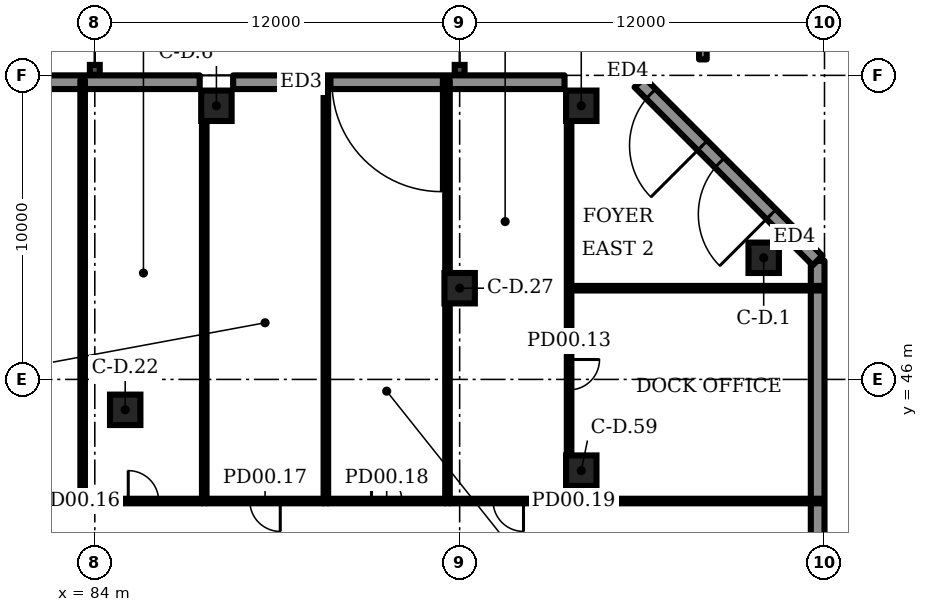
"""IFC4 building model, lengths in metres.
Left out: names, types, materials, properties, quantities, classifications, styles, units other than length and angle.
Written with IfcOpenShell. Run it as: python <this file> out.ifc"""

import sys

from ifc_helpers import new_model, si_unit, direction, frame, frame_2d, origin, origin_2d, place, context, subcontext, project, spatial, rectangle, hollow_circle, extrude, element, fill, save


model = new_model("IFC4")
c1 = context("Model", 3, precision=1e-05, world=origin(), true_north=direction((0.0, 1.0)))
c2 = subcontext(c1, "Body", "Model", "MODEL_VIEW")
j1 = project(units=[si_unit("LENGTHUNIT", "METRE"), si_unit("PLANEANGLEUNIT", "RADIAN")], contexts=[c1])
p1 = place(None, origin())
s1 = spatial("IfcSite", under=j1, at=p1, CompositionType="ELEMENT")
p2 = place(p1, origin())
s2 = spatial("IfcBuilding", under=s1, at=p2, CompositionType="ELEMENT")
p3 = place(p2, origin())
s3 = spatial("IfcBuildingStorey", under=s2, at=p3, CompositionType="ELEMENT", Elevation=0.0)
for number, where, z_axis, x_axis in (
    (1, (106.0, 50.0, 0.0), (0.0, 0.0, 1.0), (1.0, 0.0, 0.0)),
    (2, (88.0, 55.0, 0.0), (0.0, 0.0, 1.0), (1.0, 0.0, 0.0)),
    (3, (85.0, 45.0, 0.0), (0.0, 0.0, 1.0), (1.0, 0.0, 0.0)),
    (4, (96.0, 49.0, 0.0), (0.0, 0.0, 1.0), (1.0, 0.0, 0.0)),
    (5, (100.0, 43.0, 0.0), (0.0, 0.0, 1.0), (1.0, 0.0, 0.0)),
    (6, (100.0, 55.0, 0.0), (0.0, 0.0, 1.0), (1.0, 0.0, 0.0)),
):
    element("IfcColumn", number, at=place(p3, frame(where, z_axis=z_axis, x_axis=x_axis)), inside=s3, PredefinedType="COLUMN", context=c2, shape_type="SweptSolid", body=[
        extrude(rectangle(XDim=1.0, YDim=1.0, at=origin_2d()), origin(), (0.0, 0.0, 1.0), 8.0),
    ])
p4 = place(p3, frame((107.775, 26.55, 0.0), z_axis=(0.0, 0.0, 1.0), x_axis=(0.0, 1.0, 0.0)))
e7 = element("IfcWall", 7, at=p4, inside=s3, PredefinedType="SOLIDWALL", context=c2, shape_type="SweptSolid", body=[
    extrude(rectangle(XDim=23.35, YDim=0.45, at=frame_2d((11.675, 0.0))), origin(), (0.0, 0.0, 1.0), 7.7),
])
p5 = place(p4, frame((10.85, 0.0, 0.0)))
e8 = element("IfcOpeningElement", 8, at=p5, cuts=e7, PredefinedType="OPENING", context=c2, shape_type="SweptSolid", body=[
    extrude(rectangle(XDim=2.4, YDim=2.4, at=frame_2d((1.2, 1.2))), frame((0.0, 0.235, 0.0), z_axis=(0.0, -1.0, 0.0), x_axis=(1.0, 0.0, 0.0)), (0.0, 0.0, 1.0), 0.47),
])
p6 = place(p3, frame((107.77, 49.912, 0.0), z_axis=(0.0, 0.0, 1.0), x_axis=(-0.707107, 0.707107, 0.0)))
e9 = element("IfcWall", 9, at=p6, inside=s3, PredefinedType="SOLIDWALL", context=c2, shape_type="SweptSolid", body=[
    extrude(rectangle(XDim=8.285, YDim=0.45, at=frame_2d((4.143, 0.0))), origin(), (0.0, 0.0, 1.0), 7.7),
])
p7 = place(p6, frame((2.15, 0.0, 0.0)))
e10 = element("IfcOpeningElement", 10, at=p7, cuts=e9, PredefinedType="OPENING", context=c2, shape_type="SweptSolid", body=[
    extrude(rectangle(XDim=2.4, YDim=2.4, at=frame_2d((1.2, 1.2))), frame((0.0, 0.235, 0.0), z_axis=(0.0, -1.0, 0.0), x_axis=(1.0, 0.0, 0.0)), (0.0, 0.0, 1.0), 0.47),
])
p8 = place(p6, frame((5.35, 0.0, 0.0)))
e11 = element("IfcOpeningElement", 11, at=p8, cuts=e9, PredefinedType="OPENING", context=c2, shape_type="SweptSolid", body=[
    extrude(rectangle(XDim=2.4, YDim=2.4, at=frame_2d((1.2, 1.2))), frame((0.0, 0.235, 0.0), z_axis=(0.0, -1.0, 0.0), x_axis=(1.0, 0.0, 0.0)), (0.0, 0.0, 1.0), 0.47),
])
p9 = place(p3, frame((99.45, 55.775, 0.0), z_axis=(0.0, 0.0, 1.0), x_axis=(-1.0, 0.0, 0.0)))
e12 = element("IfcWall", 12, at=p9, inside=s3, PredefinedType="SOLIDWALL", context=c2, shape_type="SweptSolid", body=[
    extrude(rectangle(XDim=10.9, YDim=0.45, at=frame_2d((5.45, 0.0))), origin(), (0.0, 0.0, 1.0), 7.7),
])
p10 = place(p9, frame((4.05, 0.0, 0.0)))
e13 = element("IfcOpeningElement", 13, at=p10, cuts=e12, PredefinedType="OPENING", context=c2, shape_type="SweptSolid", body=[
    extrude(rectangle(XDim=3.6, YDim=4.5, at=frame_2d((1.8, 2.25))), frame((0.0, 0.235, 0.0), z_axis=(0.0, -1.0, 0.0), x_axis=(1.0, 0.0, 0.0)), (0.0, 0.0, 1.0), 0.47),
])
p11 = place(p3, frame((87.45, 55.775, 0.0), z_axis=(0.0, 0.0, 1.0), x_axis=(-1.0, 0.0, 0.0)))
e14 = element("IfcWall", 14, at=p11, inside=s3, PredefinedType="SOLIDWALL", context=c2, shape_type="SweptSolid", body=[
    extrude(rectangle(XDim=10.9, YDim=0.45, at=frame_2d((5.45, 0.0))), origin(), (0.0, 0.0, 1.0), 7.7),
])
p12 = place(p11, frame((5.25, 0.0, 0.0)))
e15 = element("IfcOpeningElement", 15, at=p12, cuts=e14, PredefinedType="OPENING", context=c2, shape_type="SweptSolid", body=[
    extrude(rectangle(XDim=3.6, YDim=4.5, at=frame_2d((1.8, 2.25))), frame((0.0, 0.235, 0.0), z_axis=(0.0, -1.0, 0.0), x_axis=(1.0, 0.0, 0.0)), (0.0, 0.0, 1.0), 0.47),
])
p13 = place(p3, frame((104.0, 64.0, 0.0), z_axis=(0.0, 0.0, 1.0), x_axis=(0.0, -1.0, 0.0)))
e16 = element("IfcWall", 16, at=p13, inside=s3, PredefinedType="SOLIDWALL", context=c2, shape_type="SweptSolid", body=[
    extrude(rectangle(XDim=7.475, YDim=0.25, at=frame_2d((3.738, 0.0))), origin(), (0.0, 0.0, 1.0), 2.6),
])
p14 = place(p13, frame((3.038, 0.0, 0.0)))
e17 = element("IfcOpeningElement", 17, at=p14, cuts=e16, PredefinedType="OPENING", context=c2, shape_type="SweptSolid", body=[
    extrude(rectangle(XDim=1.4, YDim=2.2, at=frame_2d((0.7, 1.1))), frame((0.0, 0.135, 0.0), z_axis=(0.0, -1.0, 0.0), x_axis=(1.0, 0.0, 0.0)), (0.0, 0.0, 1.0), 0.27),
])
p15 = place(p3, frame((83.675, 42.0, 0.0), z_axis=(0.0, 0.0, 1.0), x_axis=(1.0, 0.0, 0.0)))
e18 = element("IfcWall", 18, at=p15, inside=s3, PredefinedType="PARTITIONING", context=c2, shape_type="SweptSolid", body=[
    extrude(rectangle(XDim=3.85, YDim=0.15, at=frame_2d((1.925, 0.0))), origin(), (0.0, 0.0, 1.0), 7.7),
])
p16 = place(p15, frame((1.425, 0.0, 0.0)))
e19 = element("IfcOpeningElement", 19, at=p16, cuts=e18, PredefinedType="OPENING", context=c2, shape_type="SweptSolid", body=[
    extrude(rectangle(XDim=1.0, YDim=2.1, at=frame_2d((0.5, 1.05))), frame((0.0, 0.085, 0.0), z_axis=(0.0, -1.0, 0.0), x_axis=(1.0, 0.0, 0.0)), (0.0, 0.0, 1.0), 0.17),
])
p17 = place(p3, frame((87.675, 42.0, 0.0), z_axis=(0.0, 0.0, 1.0), x_axis=(1.0, 0.0, 0.0)))
e20 = element("IfcWall", 20, at=p17, inside=s3, PredefinedType="PARTITIONING", context=c2, shape_type="SweptSolid", body=[
    extrude(rectangle(XDim=3.85, YDim=0.15, at=frame_2d((1.925, 0.0))), origin(), (0.0, 0.0, 1.0), 7.7),
])
p18 = place(p17, frame((1.425, 0.0, 0.0)))
e21 = element("IfcOpeningElement", 21, at=p18, cuts=e20, PredefinedType="OPENING", context=c2, shape_type="SweptSolid", body=[
    extrude(rectangle(XDim=1.0, YDim=2.1, at=frame_2d((0.5, 1.05))), frame((0.0, 0.085, 0.0), z_axis=(0.0, -1.0, 0.0), x_axis=(1.0, 0.0, 0.0)), (0.0, 0.0, 1.0), 0.17),
])
p19 = place(p3, frame((91.675, 42.0, 0.0), z_axis=(0.0, 0.0, 1.0), x_axis=(1.0, 0.0, 0.0)))
e22 = element("IfcWall", 22, at=p19, inside=s3, PredefinedType="PARTITIONING", context=c2, shape_type="SweptSolid", body=[
    extrude(rectangle(XDim=3.85, YDim=0.15, at=frame_2d((1.925, 0.0))), origin(), (0.0, 0.0, 1.0), 7.7),
])
p20 = place(p19, frame((1.425, 0.0, 0.0)))
e23 = element("IfcOpeningElement", 23, at=p20, cuts=e22, PredefinedType="OPENING", context=c2, shape_type="SweptSolid", body=[
    extrude(rectangle(XDim=1.0, YDim=2.1, at=frame_2d((0.5, 1.05))), frame((0.0, 0.085, 0.0), z_axis=(0.0, -1.0, 0.0), x_axis=(1.0, 0.0, 0.0)), (0.0, 0.0, 1.0), 0.17),
])
p21 = place(p3, frame((95.675, 42.0, 0.0), z_axis=(0.0, 0.0, 1.0), x_axis=(1.0, 0.0, 0.0)))
e24 = element("IfcWall", 24, at=p21, inside=s3, PredefinedType="PARTITIONING", context=c2, shape_type="SweptSolid", body=[
    extrude(rectangle(XDim=3.85, YDim=0.15, at=frame_2d((1.925, 0.0))), origin(), (0.0, 0.0, 1.0), 7.7),
])
p22 = place(p21, frame((1.425, 0.0, 0.0)))
e25 = element("IfcOpeningElement", 25, at=p22, cuts=e24, PredefinedType="OPENING", context=c2, shape_type="SweptSolid", body=[
    extrude(rectangle(XDim=1.0, YDim=2.1, at=frame_2d((0.5, 1.05))), frame((0.0, 0.085, 0.0), z_axis=(0.0, -1.0, 0.0), x_axis=(1.0, 0.0, 0.0)), (0.0, 0.0, 1.0), 0.17),
])
for number, where, z_axis, x_axis in (
    (26, (99.675, 42.0, 0.0), (0.0, 0.0, 1.0), (1.0, 0.0, 0.0)),
    (27, (99.675, 49.0, 0.0), (0.0, 0.0, 1.0), (1.0, 0.0, 0.0)),
):
    element("IfcWall", number, at=place(p3, frame(where, z_axis=z_axis, x_axis=x_axis)), inside=s3, PredefinedType="PARTITIONING", context=c2, shape_type="SweptSolid", body=[
        extrude(rectangle(XDim=8.22, YDim=0.15, at=frame_2d((4.11, 0.0))), origin(), (0.0, 0.0, 1.0), 7.7),
    ])
p23 = place(p3, frame((99.6, 41.925, 0.0), z_axis=(0.0, 0.0, 1.0), x_axis=(0.0, 1.0, 0.0)))
e28 = element("IfcWall", 28, at=p23, inside=s3, PredefinedType="PARTITIONING", context=c2, shape_type="SweptSolid", body=[
    extrude(rectangle(XDim=0.565, YDim=0.15, at=frame_2d((0.282, 0.0))), origin(), (0.0, 0.0, 1.0), 7.7),
])
p24 = place(p3, frame((99.6, 43.51, 0.0), z_axis=(0.0, 0.0, 1.0), x_axis=(0.0, 1.0, 0.0)))
e29 = element("IfcWall", 29, at=p24, inside=s3, PredefinedType="PARTITIONING", context=c2, shape_type="SweptSolid", body=[
    extrude(rectangle(XDim=10.98, YDim=0.15, at=frame_2d((5.49, 0.0))), origin(), (0.0, 0.0, 1.0), 7.7),
])
p25 = place(p24, frame((2.145, 0.0, 0.0)))
e30 = element("IfcOpeningElement", 30, at=p25, cuts=e29, PredefinedType="OPENING", context=c2, shape_type="SweptSolid", body=[
    extrude(rectangle(XDim=1.0, YDim=2.1, at=frame_2d((0.5, 1.05))), frame((0.0, 0.085, 0.0), z_axis=(0.0, -1.0, 0.0), x_axis=(1.0, 0.0, 0.0)), (0.0, 0.0, 1.0), 0.17),
])
p26 = place(p3, frame((87.6, 41.925, 0.0), z_axis=(0.0, 0.0, 1.0), x_axis=(0.0, 1.0, 0.0)))
e31 = element("IfcWall", 31, at=p26, inside=s3, PredefinedType="PARTITIONING", context=c2, shape_type="SweptSolid", body=[
    extrude(rectangle(XDim=12.565, YDim=0.15, at=frame_2d((6.282, 0.0))), origin(), (0.0, 0.0, 1.0), 7.7),
])
for number, where, z_axis, x_axis in (
    (32, (83.6, 41.925, 0.0), (0.0, 0.0, 1.0), (0.0, 1.0, 0.0)),
    (33, (91.6, 41.925, 0.0), (0.0, 0.0, 1.0), (0.0, 1.0, 0.0)),
):
    element("IfcWall", number, at=place(p3, frame(where, z_axis=z_axis, x_axis=x_axis)), inside=s3, PredefinedType="PARTITIONING", context=c2, shape_type="SweptSolid", body=[
        extrude(rectangle(XDim=13.925, YDim=0.15, at=frame_2d((6.962, 0.0))), origin(), (0.0, 0.0, 1.0), 7.7),
    ])
p27 = place(p3, frame((95.6, 41.925, 0.0), z_axis=(0.0, 0.0, 1.0), x_axis=(0.0, 1.0, 0.0)))
e34 = element("IfcWall", 34, at=p27, inside=s3, PredefinedType="PARTITIONING", context=c2, shape_type="SweptSolid", body=[
    extrude(rectangle(XDim=6.565, YDim=0.15, at=frame_2d((3.282, 0.0))), origin(), (0.0, 0.0, 1.0), 7.7),
])
p28 = place(p3, frame((95.6, 49.51, 0.0), z_axis=(0.0, 0.0, 1.0), x_axis=(0.0, 1.0, 0.0)))
e35 = element("IfcWall", 35, at=p28, inside=s3, PredefinedType="PARTITIONING", context=c2, shape_type="SweptSolid", body=[
    extrude(rectangle(XDim=6.34, YDim=0.15, at=frame_2d((3.17, 0.0))), origin(), (0.0, 0.0, 1.0), 7.7),
])
for number, where, z_axis, x_axis in (
    (36, (84.0, 56.182, 0.0), (0.0, 0.0, 1.0), (1.0, 0.0, 0.0)),
    (37, (96.0, 56.182, 0.0), (0.0, 0.0, 1.0), (1.0, 0.0, 0.0)),
):
    element("IfcColumn", number, at=place(p3, frame(where, z_axis=z_axis, x_axis=x_axis)), inside=s3, PredefinedType="COLUMN", context=c2, shape_type="SweptSolid", body=[
        extrude(hollow_circle(Radius=0.162, WallThickness=0.01, at=origin_2d()), origin(), (0.0, 0.0, 1.0), 3.2),
    ])
p29 = place(p7, origin())
e38 = element("IfcDoor", 38, at=p29, inside=s3, OperationType="DOUBLE_DOOR_DOUBLE_SWING", PredefinedType="DOOR", context=c2, shape_type="SweptSolid", body=[
    extrude(rectangle(XDim=2.4, YDim=2.4, at=frame_2d((1.2, 1.2))), frame((0.0, 0.025, 0.0), z_axis=(0.0, -1.0, 0.0), x_axis=(1.0, 0.0, 0.0)), (0.0, 0.0, 1.0), 0.05),
])
fill(e10, e38)
p30 = place(p8, origin())
e39 = element("IfcDoor", 39, at=p30, inside=s3, OperationType="DOUBLE_DOOR_DOUBLE_SWING", PredefinedType="DOOR", context=c2, shape_type="SweptSolid", body=[
    extrude(rectangle(XDim=2.4, YDim=2.4, at=frame_2d((1.2, 1.2))), frame((0.0, 0.025, 0.0), z_axis=(0.0, -1.0, 0.0), x_axis=(1.0, 0.0, 0.0)), (0.0, 0.0, 1.0), 0.05),
])
fill(e11, e39)
p31 = place(p10, origin())
e40 = element("IfcDoor", 40, at=p31, inside=s3, OperationType="ROLLINGUP", PredefinedType="DOOR", context=c2, shape_type="SweptSolid", body=[
    extrude(rectangle(XDim=3.6, YDim=4.5, at=frame_2d((1.8, 2.25))), frame((0.0, 0.025, 0.0), z_axis=(0.0, -1.0, 0.0), x_axis=(1.0, 0.0, 0.0)), (0.0, 0.0, 1.0), 0.05),
])
fill(e13, e40)
p32 = place(p25, origin())
e41 = element("IfcDoor", 41, at=p32, inside=s3, OperationType="SINGLE_SWING_RIGHT", PredefinedType="DOOR", context=c2, shape_type="SweptSolid", body=[
    extrude(rectangle(XDim=1.0, YDim=2.1, at=frame_2d((0.5, 1.05))), frame((0.0, 0.025, 0.0), z_axis=(0.0, -1.0, 0.0), x_axis=(1.0, 0.0, 0.0)), (0.0, 0.0, 1.0), 0.05),
])
fill(e30, e41)
p33 = place(p16, origin())
e42 = element("IfcDoor", 42, at=p33, inside=s3, OperationType="SINGLE_SWING_LEFT", PredefinedType="DOOR", context=c2, shape_type="SweptSolid", body=[
    extrude(rectangle(XDim=1.0, YDim=2.1, at=frame_2d((0.5, 1.05))), frame((0.0, 0.025, 0.0), z_axis=(0.0, -1.0, 0.0), x_axis=(1.0, 0.0, 0.0)), (0.0, 0.0, 1.0), 0.05),
])
fill(e19, e42)
p34 = place(p18, origin())
e43 = element("IfcDoor", 43, at=p34, inside=s3, OperationType="SINGLE_SWING_RIGHT", PredefinedType="DOOR", context=c2, shape_type="SweptSolid", body=[
    extrude(rectangle(XDim=1.0, YDim=2.1, at=frame_2d((0.5, 1.05))), frame((0.0, 0.025, 0.0), z_axis=(0.0, -1.0, 0.0), x_axis=(1.0, 0.0, 0.0)), (0.0, 0.0, 1.0), 0.05),
])
fill(e21, e43)
p35 = place(p20, origin())
e44 = element("IfcDoor", 44, at=p35, inside=s3, OperationType="SINGLE_SWING_LEFT", PredefinedType="DOOR", context=c2, shape_type="SweptSolid", body=[
    extrude(rectangle(XDim=1.0, YDim=2.1, at=frame_2d((0.5, 1.05))), frame((0.0, 0.025, 0.0), z_axis=(0.0, -1.0, 0.0), x_axis=(1.0, 0.0, 0.0)), (0.0, 0.0, 1.0), 0.05),
])
fill(e23, e44)
p36 = place(p22, origin())
e45 = element("IfcDoor", 45, at=p36, inside=s3, OperationType="SINGLE_SWING_RIGHT", PredefinedType="DOOR", context=c2, shape_type="SweptSolid", body=[
    extrude(rectangle(XDim=1.0, YDim=2.1, at=frame_2d((0.5, 1.05))), frame((0.0, 0.025, 0.0), z_axis=(0.0, -1.0, 0.0), x_axis=(1.0, 0.0, 0.0)), (0.0, 0.0, 1.0), 0.05),
])
fill(e25, e45)
save(model, sys.argv[1])
